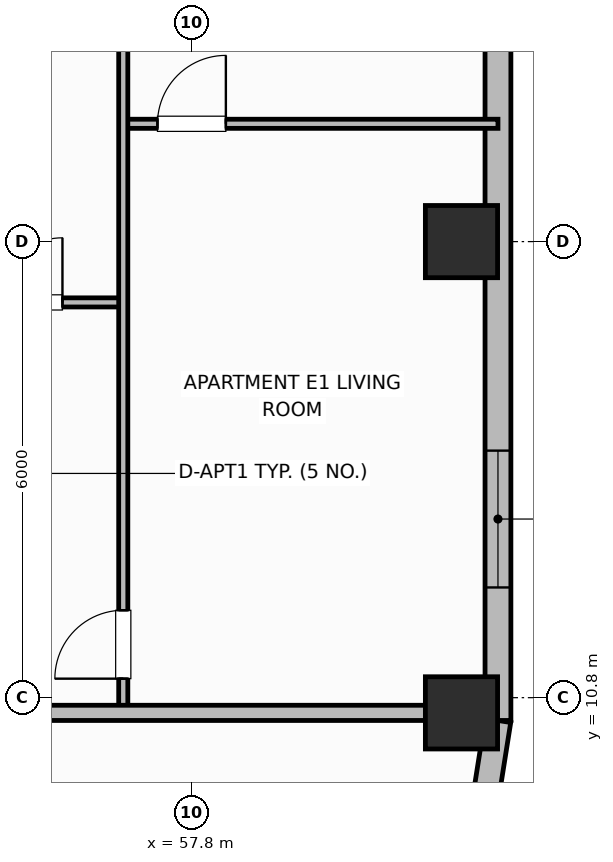
"""IFC4 building model, lengths in metres.
Left out: names, types, materials, properties, quantities, classifications, styles, units other than length and angle.
Written with IfcOpenShell. Run it as: python <this file> out.ifc"""

import sys

from ifc_helpers import new_model, si_unit, direction, frame, frame_2d, origin, origin_2d, place, context, subcontext, project, spatial, rectangle, extrude, element, fill, save


model = new_model("IFC4")
c1 = context("Model", 3, precision=1e-05, world=origin(), true_north=direction((0.0, 1.0)))
c2 = subcontext(c1, "Body", "Model", "MODEL_VIEW")
j1 = project(units=[si_unit("LENGTHUNIT", "METRE"), si_unit("PLANEANGLEUNIT", "RADIAN")], contexts=[c1])
p1 = place(None, origin())
s1 = spatial("IfcSite", under=j1, at=p1, CompositionType="ELEMENT")
p2 = place(p1, origin())
s2 = spatial("IfcBuilding", under=s1, at=p2, CompositionType="ELEMENT")
p3 = place(p2, frame((0.0, 0.0, 158.9)))
s3 = spatial("IfcBuildingStorey", under=s2, at=p3, CompositionType="ELEMENT", Elevation=158.9)
for number, where, z_axis, x_axis in (
    (1, (61.35, 10.6, 0.0), (0.0, 0.0, 1.0), (1.0, 0.0, 0.0)),
    (2, (61.35, 16.8, 0.0), (0.0, 0.0, 1.0), (1.0, 0.0, 0.0)),
):
    element("IfcColumn", number, at=place(p3, frame(where, z_axis=z_axis, x_axis=x_axis)), inside=s3, PredefinedType="COLUMN", context=c2, shape_type="SweptSolid", body=[
        extrude(rectangle(XDim=0.95, YDim=0.95, at=origin_2d()), origin(), (0.0, 0.0, 1.0), 3.7),
    ])
p4 = place(p3, frame((61.652, 9.378, 0.0), z_axis=(0.0, 0.0, 1.0), x_axis=(0.156514556949, 0.987675651954, 0.0)))
e3 = element("IfcWall", 3, at=p4, inside=s3, PredefinedType="SOLIDWALL", context=c2, shape_type="SweptSolid", body=[
    extrude(rectangle(XDim=1.135, YDim=0.34, at=frame_2d((0.568, 0.0))), origin(), (0.0, 0.0, 1.0), 2.72),
])
p5 = place(p3, frame((61.83, 10.5, 0.0), z_axis=(0.0, 0.0, 1.0), x_axis=(0.0, 1.0, 0.0)))
e4 = element("IfcWall", 4, at=p5, inside=s3, PredefinedType="SOLIDWALL", context=c2, shape_type="SweptSolid", body=[
    extrude(rectangle(XDim=13.3, YDim=0.34, at=frame_2d((6.65, 0.0))), origin(), (0.0, 0.0, 1.0), 2.72),
])
p6 = place(p5, frame((1.75, 0.0, 0.75)))
e5 = element("IfcOpeningElement", 5, at=p6, cuts=e4, PredefinedType="OPENING", context=c2, shape_type="SweptSolid", body=[
    extrude(rectangle(XDim=1.8, YDim=1.85, at=frame_2d((0.9, 0.925))), frame((0.0, 0.18, 0.0), z_axis=(0.0, -1.0, 0.0), x_axis=(1.0, 0.0, 0.0)), (0.0, 0.0, 1.0), 0.36),
])
p7 = place(p5, frame((9.75, 0.0, 0.75)))
e6 = element("IfcOpeningElement", 6, at=p7, cuts=e4, PredefinedType="OPENING", context=c2, shape_type="SweptSolid", body=[
    extrude(rectangle(XDim=1.8, YDim=1.85, at=frame_2d((0.9, 0.925))), frame((0.0, 0.18, 0.0), z_axis=(0.0, -1.0, 0.0), x_axis=(1.0, 0.0, 0.0)), (0.0, 0.0, 1.0), 0.36),
])
p8 = place(p3, frame((54.65, 16.0, 0.0), z_axis=(0.0, 0.0, 1.0), x_axis=(1.0, 0.0, 0.0)))
e7 = element("IfcWall", 7, at=p8, inside=s3, PredefinedType="PARTITIONING", context=c2, shape_type="SweptSolid", body=[
    extrude(rectangle(XDim=2.25, YDim=0.12, at=frame_2d((1.125, 0.0))), origin(), (0.0, 0.0, 1.0), 2.55),
])
p9 = place(p8, frame((0.6, 0.0, 0.0)))
e8 = element("IfcOpeningElement", 8, at=p9, cuts=e7, PredefinedType="OPENING", context=c2, shape_type="SweptSolid", body=[
    extrude(rectangle(XDim=0.85, YDim=2.1, at=frame_2d((0.425, 1.05))), frame((0.0, 0.07, 0.0), z_axis=(0.0, -1.0, 0.0), x_axis=(1.0, 0.0, 0.0)), (0.0, 0.0, 1.0), 0.14),
])
p10 = place(p3, frame((56.9, 18.35, 0.0), z_axis=(0.0, 0.0, 1.0), x_axis=(1.0, 0.0, 0.0)))
e9 = element("IfcWall", 9, at=p10, inside=s3, PredefinedType="PARTITIONING", context=c2, shape_type="SweptSolid", body=[
    extrude(rectangle(XDim=4.93, YDim=0.12, at=frame_2d((2.465, 0.0))), origin(), (0.0, 0.0, 1.0), 2.55),
])
p11 = place(p10, frame((0.45, 0.0, 0.0)))
e10 = element("IfcOpeningElement", 10, at=p11, cuts=e9, PredefinedType="OPENING", context=c2, shape_type="SweptSolid", body=[
    extrude(rectangle(XDim=0.9, YDim=2.1, at=frame_2d((0.45, 1.05))), frame((0.0, 0.07, 0.0), z_axis=(0.0, -1.0, 0.0), x_axis=(1.0, 0.0, 0.0)), (0.0, 0.0, 1.0), 0.14),
])
p12 = place(p3, frame((56.9, 10.64, 0.0), z_axis=(0.0, 0.0, 1.0), x_axis=(0.0, 1.0, 0.0)))
e11 = element("IfcWall", 11, at=p12, inside=s3, PredefinedType="PARTITIONING", context=c2, shape_type="SweptSolid", body=[
    extrude(rectangle(XDim=19.12, YDim=0.12, at=frame_2d((9.56, 0.0))), origin(), (0.0, 0.0, 1.0), 2.55),
])
p13 = place(p12, frame((0.41, 0.0, 0.0)))
e12 = element("IfcOpeningElement", 12, at=p13, cuts=e11, PredefinedType="OPENING", context=c2, shape_type="SweptSolid", body=[
    extrude(rectangle(XDim=0.9, YDim=2.1, at=frame_2d((0.45, 1.05))), frame((0.0, 0.07, 0.0), z_axis=(0.0, -1.0, 0.0), x_axis=(1.0, 0.0, 0.0)), (0.0, 0.0, 1.0), 0.14),
])
p14 = place(p12, frame((13.735, 0.0, 0.0)))
e13 = element("IfcOpeningElement", 13, at=p14, cuts=e11, PredefinedType="OPENING", context=c2, shape_type="SweptSolid", body=[
    extrude(rectangle(XDim=0.82, YDim=2.08, at=frame_2d((0.41, 1.04))), frame((0.0, 0.07, 0.0), z_axis=(0.0, -1.0, 0.0), x_axis=(1.0, 0.0, 0.0)), (0.0, 0.0, 1.0), 0.14),
])
p15 = place(p3, frame((54.65, 10.6, 0.0), z_axis=(0.0, 0.0, 1.0), x_axis=(1.0, 0.0, 0.0)))
e14 = element("IfcWall", 14, at=p15, inside=s3, PredefinedType="PARTITIONING", context=c2, shape_type="SweptSolid", body=[
    extrude(rectangle(XDim=6.76, YDim=0.2, at=frame_2d((3.38, 0.0))), origin(), (0.0, 0.0, 1.0), 2.55),
])
p16 = place(p6, origin())
e15 = element("IfcWindow", 15, at=p16, inside=s3, PartitioningType="SINGLE_PANEL", PredefinedType="WINDOW", context=c2, shape_type="SweptSolid", body=[
    extrude(rectangle(XDim=1.8, YDim=1.85, at=frame_2d((0.9, 0.925))), frame((0.0, 0.03, 0.0), z_axis=(0.0, -1.0, 0.0), x_axis=(1.0, 0.0, 0.0)), (0.0, 0.0, 1.0), 0.06),
])
fill(e5, e15)
p17 = place(p9, origin())
e16 = element("IfcDoor", 16, at=p17, inside=s3, OperationType="SINGLE_SWING_RIGHT", PredefinedType="DOOR", context=c2, shape_type="SweptSolid", body=[
    extrude(rectangle(XDim=0.85, YDim=2.1, at=frame_2d((0.425, 1.05))), frame((0.0, 0.025, 0.0), z_axis=(0.0, -1.0, 0.0), x_axis=(1.0, 0.0, 0.0)), (0.0, 0.0, 1.0), 0.05),
])
fill(e8, e16)
p18 = place(p11, origin())
e17 = element("IfcDoor", 17, at=p18, inside=s3, OperationType="SINGLE_SWING_RIGHT", PredefinedType="DOOR", context=c2, shape_type="SweptSolid", body=[
    extrude(rectangle(XDim=0.9, YDim=2.1, at=frame_2d((0.45, 1.05))), frame((0.0, 0.025, 0.0), z_axis=(0.0, -1.0, 0.0), x_axis=(1.0, 0.0, 0.0)), (0.0, 0.0, 1.0), 0.05),
])
fill(e10, e17)
p19 = place(p13, origin())
e18 = element("IfcDoor", 18, at=p19, inside=s3, OperationType="SINGLE_SWING_LEFT", PredefinedType="DOOR", context=c2, shape_type="SweptSolid", body=[
    extrude(rectangle(XDim=0.9, YDim=2.1, at=frame_2d((0.45, 1.05))), frame((0.0, 0.025, 0.0), z_axis=(0.0, -1.0, 0.0), x_axis=(1.0, 0.0, 0.0)), (0.0, 0.0, 1.0), 0.05),
])
fill(e12, e18)
save(model, sys.argv[1])
